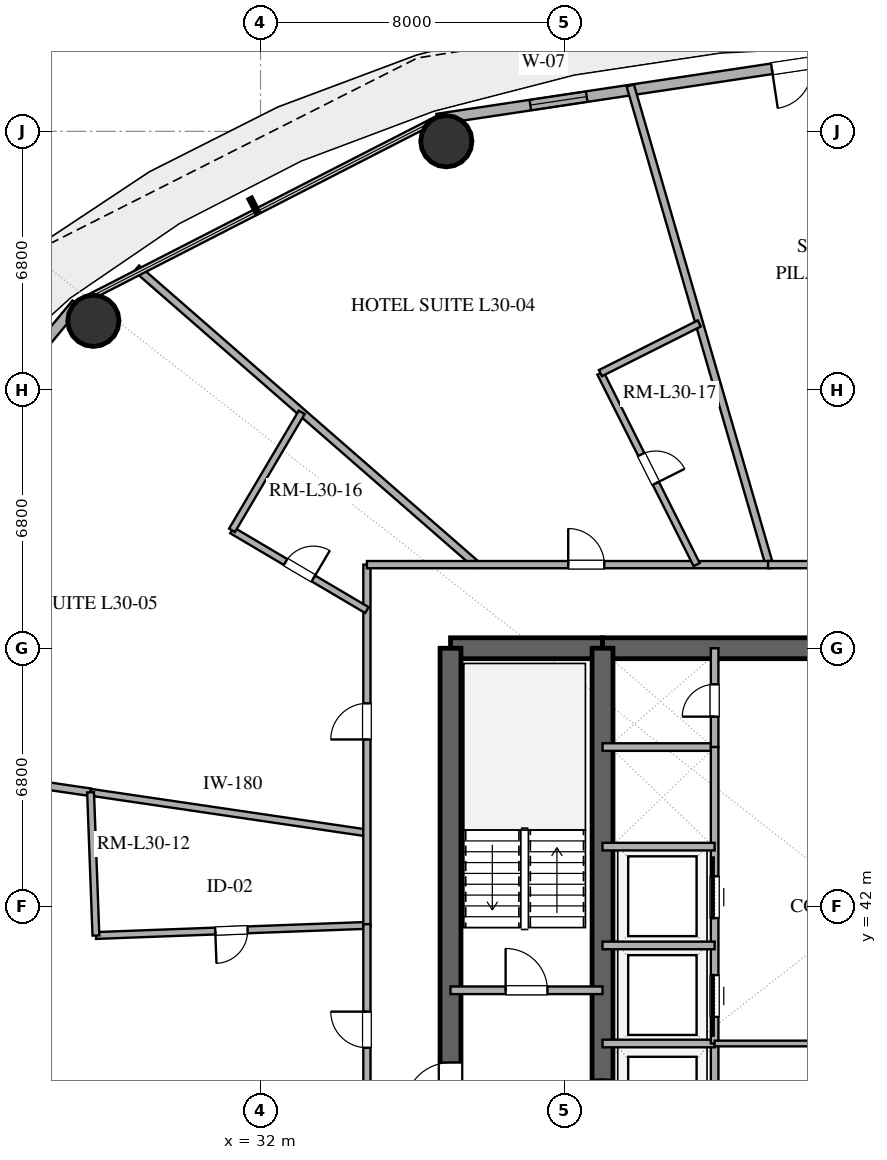
"""IFC4 building model, lengths in metres.
Left out: names, types, materials, properties, quantities, classifications, styles, units other than length and angle.
Written with IfcOpenShell. Run it as: python <this file> out.ifc"""

import sys

from ifc_helpers import new_model, si_unit, direction, frame, frame_2d, origin, origin_2d, place, context, subcontext, project, spatial, rectangle, hollow_circle, extrude, element, fill, save


model = new_model("IFC4")
c1 = context("Model", 3, precision=1e-05, world=origin(), true_north=direction((0.0, 1.0)))
c2 = subcontext(c1, "Body", "Model", "MODEL_VIEW")
j1 = project(units=[si_unit("LENGTHUNIT", "METRE"), si_unit("PLANEANGLEUNIT", "RADIAN")], contexts=[c1])
p1 = place(None, origin())
s1 = spatial("IfcSite", under=j1, at=p1, CompositionType="ELEMENT")
p2 = place(p1, origin())
s2 = spatial("IfcBuilding", under=s1, at=p2, CompositionType="ELEMENT")
p3 = place(p2, frame((0.0, 0.0, 120.0)))
s3 = spatial("IfcBuildingStorey", under=s2, at=p3, CompositionType="ELEMENT", Elevation=120.0)
p4 = place(p3, frame((37.0, 48.8, 0.0), z_axis=(0.0, 0.0, 1.0), x_axis=(1.0, 0.0, 0.0)))
e1 = element("IfcWall", 1, at=p4, inside=s3, PredefinedType="SHEAR", context=c2, shape_type="SweptSolid", body=[
    extrude(rectangle(XDim=4.0, YDim=0.55, at=frame_2d((2.0, 0.0))), origin(), (0.0, 0.0, 1.0), 3.38),
])
p5 = place(p3, frame((41.0, 48.8, 0.0), z_axis=(0.0, 0.0, 1.0), x_axis=(1.0, 0.0, 0.0)))
e2 = element("IfcWall", 2, at=p5, inside=s3, PredefinedType="SHEAR", context=c2, shape_type="SweptSolid", body=[
    extrude(rectangle(XDim=14.0, YDim=0.55, at=frame_2d((7.0, 0.0))), origin(), (0.0, 0.0, 1.0), 3.38),
])
p6 = place(p5, frame((6.1, 0.0, 0.0)))
e3 = element("IfcOpeningElement", 3, at=p6, cuts=e2, PredefinedType="OPENING", context=c2, shape_type="SweptSolid", body=[
    extrude(rectangle(XDim=1.8, YDim=2.25, at=frame_2d((0.9, 1.125))), frame((0.0, 0.285, 0.0), z_axis=(0.0, -1.0, 0.0), x_axis=(1.0, 0.0, 0.0)), (0.0, 0.0, 1.0), 0.57),
])
p7 = place(p3, frame((37.0, 35.2, 0.0), z_axis=(0.0, 0.0, 1.0), x_axis=(0.0, 1.0, 0.0)))
e4 = element("IfcWall", 4, at=p7, inside=s3, PredefinedType="SHEAR", context=c2, shape_type="SweptSolid", body=[
    extrude(rectangle(XDim=13.6, YDim=0.55, at=frame_2d((6.8, 0.0))), origin(), (0.0, 0.0, 1.0), 3.38),
])
p8 = place(p7, frame((1.5, 0.0, 0.0)))
e5 = element("IfcOpeningElement", 5, at=p8, cuts=e4, PredefinedType="OPENING", context=c2, shape_type="SweptSolid", body=[
    extrude(rectangle(XDim=1.2, YDim=2.15, at=frame_2d((0.6, 1.075))), frame((0.0, 0.285, 0.0), z_axis=(0.0, -1.0, 0.0), x_axis=(1.0, 0.0, 0.0)), (0.0, 0.0, 1.0), 0.57),
])
p9 = place(p3, frame((41.0, 35.2, 0.0), z_axis=(0.0, 0.0, 1.0), x_axis=(0.0, 1.0, 0.0)))
e6 = element("IfcWall", 6, at=p9, inside=s3, PredefinedType="SHEAR", context=c2, shape_type="SweptSolid", body=[
    extrude(rectangle(XDim=13.6, YDim=0.55, at=frame_2d((6.8, 0.0))), origin(), (0.0, 0.0, 1.0), 3.38),
])
p10 = place(p9, frame((1.15, 0.0, 0.0)))
e7 = element("IfcOpeningElement", 7, at=p10, cuts=e6, PredefinedType="OPENING", context=c2, shape_type="SweptSolid", body=[
    extrude(rectangle(XDim=1.1, YDim=2.2, at=frame_2d((0.55, 1.1))), frame((0.0, 0.285, 0.0), z_axis=(0.0, -1.0, 0.0), x_axis=(1.0, 0.0, 0.0)), (0.0, 0.0, 1.0), 0.57),
])
for number, where, z_axis, x_axis in (
    (8, (36.89, 62.141, 0.0), (0.0, 0.0, 1.0), (1.0, 0.0, 0.0)),
    (9, (27.602, 57.415, 0.0), (0.0, 0.0, 1.0), (1.0, 0.0, 0.0)),
):
    element("IfcColumn", number, at=place(p3, frame(where, z_axis=z_axis, x_axis=x_axis)), inside=s3, PredefinedType="COLUMN", context=c2, shape_type="SweptSolid", body=[
        extrude(hollow_circle(Radius=0.675, WallThickness=0.036, at=origin_2d()), origin(), (0.0, 0.0, 1.0), 3.38),
    ])
p11 = place(p3, frame((48.0, 64.43, 0.0), z_axis=(0.0, 0.0, 1.0), x_axis=(-0.988877774656, -0.148730450117, 0.0)))
e10 = element("IfcWall", 10, at=p11, inside=s3, PredefinedType="SOLIDWALL", context=c2, shape_type="SweptSolid", body=[
    extrude(rectangle(XDim=11.479, YDim=0.28, at=frame_2d((5.74, 0.0))), origin(), (0.0, 0.0, 1.0), 3.38),
])
p12 = place(p11, frame((1.524, 0.0, 0.0)))
e11 = element("IfcOpeningElement", 11, at=p12, cuts=e10, PredefinedType="OPENING", context=c2, shape_type="SweptSolid", body=[
    extrude(rectangle(XDim=1.05, YDim=2.2, at=frame_2d((0.525, 1.1))), frame((0.0, 0.15, 0.0), z_axis=(0.0, -1.0, 0.0), x_axis=(1.0, 0.0, 0.0)), (0.0, 0.0, 1.0), 0.3),
])
p13 = place(p11, frame((7.5, 0.0, 0.85)))
e12 = element("IfcOpeningElement", 12, at=p13, cuts=e10, PredefinedType="OPENING", context=c2, shape_type="SweptSolid", body=[
    extrude(rectangle(XDim=1.5, YDim=1.8, at=frame_2d((0.75, 0.9))), frame((0.0, 0.15, 0.0), z_axis=(0.0, -1.0, 0.0), x_axis=(1.0, 0.0, 0.0)), (0.0, 0.0, 1.0), 0.3),
])
p14 = place(p3, frame((27.16, 57.86, 0.0), z_axis=(0.0, 0.0, 1.0), x_axis=(-0.637505817448, -0.770445541696, 0.0)))
e13 = element("IfcWall", 13, at=p14, inside=s3, PredefinedType="SOLIDWALL", context=c2, shape_type="SweptSolid", body=[
    extrude(rectangle(XDim=9.445, YDim=0.28, at=frame_2d((4.723, 0.0))), origin(), (0.0, 0.0, 1.0), 3.38),
])
p15 = place(p14, frame((2.697, 0.0, 0.85)))
e14 = element("IfcOpeningElement", 14, at=p15, cuts=e13, PredefinedType="OPENING", context=c2, shape_type="SweptSolid", body=[
    extrude(rectangle(XDim=1.35, YDim=1.8, at=frame_2d((0.675, 0.9))), frame((0.0, 0.15, 0.0), z_axis=(0.0, -1.0, 0.0), x_axis=(1.0, 0.0, 0.0)), (0.0, 0.0, 1.0), 0.3),
])
p16 = place(p14, frame((5.282, 0.0, 0.85)))
e15 = element("IfcOpeningElement", 15, at=p16, cuts=e13, PredefinedType="OPENING", context=c2, shape_type="SweptSolid", body=[
    extrude(rectangle(XDim=1.35, YDim=1.8, at=frame_2d((0.675, 0.9))), frame((0.0, 0.15, 0.0), z_axis=(0.0, -1.0, 0.0), x_axis=(1.0, 0.0, 0.0)), (0.0, 0.0, 1.0), 0.3),
])
p17 = place(p3, frame((37.0, 39.8, 0.0), z_axis=(0.0, 0.0, 1.0), x_axis=(1.0, 0.0, 0.0)))
e16 = element("IfcWall", 16, at=p17, inside=s3, PredefinedType="SOLIDWALL", context=c2, shape_type="SweptSolid", body=[
    extrude(rectangle(XDim=4.0, YDim=0.2, at=frame_2d((2.0, 0.0))), origin(), (0.0, 0.0, 1.0), 2.74),
])
p18 = place(p17, frame((1.45, 0.0, 0.0)))
e17 = element("IfcOpeningElement", 17, at=p18, cuts=e16, PredefinedType="OPENING", context=c2, shape_type="SweptSolid", body=[
    extrude(rectangle(XDim=1.1, YDim=2.15, at=frame_2d((0.55, 1.075))), frame((0.0, 0.11, 0.0), z_axis=(0.0, -1.0, 0.0), x_axis=(1.0, 0.0, 0.0)), (0.0, 0.0, 1.0), 0.22),
])
p19 = place(p3, frame((43.95, 35.2, 0.0), z_axis=(0.0, 0.0, 1.0), x_axis=(0.0, 1.0, 0.0)))
e18 = element("IfcWall", 18, at=p19, inside=s3, PredefinedType="SOLIDWALL", context=c2, shape_type="SweptSolid", body=[
    extrude(rectangle(XDim=3.2, YDim=0.2, at=frame_2d((1.6, 0.0))), origin(), (0.0, 0.0, 1.0), 2.74),
])
for number, where, z_axis, x_axis in (
    (19, (41.0, 38.4, 0.0), (0.0, 0.0, 1.0), (1.0, 0.0, 0.0)),
    (20, (41.0, 46.2, 0.0), (0.0, 0.0, 1.0), (1.0, 0.0, 0.0)),
):
    element("IfcWall", number, at=place(p3, frame(where, z_axis=z_axis, x_axis=x_axis)), inside=s3, PredefinedType="SOLIDWALL", context=c2, shape_type="SweptSolid", body=[
        extrude(rectangle(XDim=2.95, YDim=0.2, at=frame_2d((1.475, 0.0))), origin(), (0.0, 0.0, 1.0), 2.74),
    ])
p20 = place(p3, frame((43.95, 46.2, 0.0), z_axis=(0.0, 0.0, 1.0), x_axis=(0.0, 1.0, 0.0)))
e21 = element("IfcWall", 21, at=p20, inside=s3, PredefinedType="SOLIDWALL", context=c2, shape_type="SweptSolid", body=[
    extrude(rectangle(XDim=2.6, YDim=0.2, at=frame_2d((1.3, 0.0))), origin(), (0.0, 0.0, 1.0), 2.74),
])
p21 = place(p20, frame((0.8, 0.0, 0.0)))
e22 = element("IfcOpeningElement", 22, at=p21, cuts=e21, PredefinedType="OPENING", context=c2, shape_type="SweptSolid", body=[
    extrude(rectangle(XDim=0.85, YDim=2.15, at=frame_2d((0.425, 1.075))), frame((0.0, 0.11, 0.0), z_axis=(0.0, -1.0, 0.0), x_axis=(1.0, 0.0, 0.0)), (0.0, 0.0, 1.0), 0.22),
])
p22 = place(p3, frame((43.95, 38.4, 0.0), z_axis=(0.0, 0.0, 1.0), x_axis=(0.0, 1.0, 0.0)))
e23 = element("IfcWall", 23, at=p22, inside=s3, PredefinedType="SOLIDWALL", context=c2, shape_type="SweptSolid", body=[
    extrude(rectangle(XDim=7.8, YDim=0.2, at=frame_2d((3.9, 0.0))), origin(), (0.0, 0.0, 1.0), 2.74),
])
p23 = place(p22, frame((0.7, 0.0, 0.0)))
e24 = element("IfcOpeningElement", 24, at=p23, cuts=e23, PredefinedType="OPENING", context=c2, shape_type="SweptSolid", body=[
    extrude(rectangle(XDim=1.1, YDim=2.2, at=frame_2d((0.55, 1.1))), frame((0.0, 0.11, 0.0), z_axis=(0.0, -1.0, 0.0), x_axis=(1.0, 0.0, 0.0)), (0.0, 0.0, 1.0), 0.22),
])
p24 = place(p22, frame((3.3, 0.0, 0.0)))
e25 = element("IfcOpeningElement", 25, at=p24, cuts=e23, PredefinedType="OPENING", context=c2, shape_type="SweptSolid", body=[
    extrude(rectangle(XDim=1.1, YDim=2.2, at=frame_2d((0.55, 1.1))), frame((0.0, 0.11, 0.0), z_axis=(0.0, -1.0, 0.0), x_axis=(1.0, 0.0, 0.0)), (0.0, 0.0, 1.0), 0.22),
])
for number, where, z_axis, x_axis in (
    (26, (41.0, 40.98, 0.0), (0.0, 0.0, 1.0), (1.0, 0.0, 0.0)),
    (27, (41.0, 43.58, 0.0), (0.0, 0.0, 1.0), (1.0, 0.0, 0.0)),
):
    element("IfcWall", number, at=place(p3, frame(where, z_axis=z_axis, x_axis=x_axis)), inside=s3, PredefinedType="SOLIDWALL", context=c2, shape_type="SweptSolid", body=[
        extrude(rectangle(XDim=2.95, YDim=0.2, at=frame_2d((1.475, 0.0))), origin(), (0.0, 0.0, 1.0), 2.74),
    ])
p25 = place(p3, frame((43.95, 38.4, 0.0), z_axis=(0.0, 0.0, 1.0), x_axis=(1.0, 0.0, 0.0)))
e28 = element("IfcWall", 28, at=p25, inside=s3, PredefinedType="PARTITIONING", context=c2, shape_type="SweptSolid", body=[
    extrude(rectangle(XDim=2.9, YDim=0.15, at=frame_2d((1.45, 0.0))), origin(), (0.0, 0.0, 1.0), 2.74),
])
p26 = place(p3, frame((19.982, 46.119, 0.0), z_axis=(0.0, 0.0, 1.0), x_axis=(0.989365774641, -0.14544883626, 0.0)))
e29 = element("IfcWall", 29, at=p26, inside=s3, PredefinedType="PARTITIONING", context=c2, shape_type="SweptSolid", body=[
    extrude(rectangle(XDim=7.627, YDim=0.2, at=frame_2d((3.813, 0.0))), origin(), (0.0, 0.0, 1.0), 2.74),
])
p27 = place(p3, frame((27.528, 45.01, 0.0), z_axis=(0.0, 0.0, 1.0), x_axis=(0.989364619243, -0.145456695238, 0.0)))
e30 = element("IfcWall", 30, at=p27, inside=s3, PredefinedType="PLUMBINGWALL", context=c2, shape_type="SweptSolid", body=[
    extrude(rectangle(XDim=7.35, YDim=0.18, at=frame_2d((3.675, 0.0))), origin(), (0.0, 0.0, 1.0), 2.74),
])
p28 = place(p3, frame((34.8, 41.508, 0.0), z_axis=(0.0, 0.0, 1.0), x_axis=(-0.999305711591, -0.037257144028, 0.0)))
e31 = element("IfcWall", 31, at=p28, inside=s3, PredefinedType="PLUMBINGWALL", context=c2, shape_type="SweptSolid", body=[
    extrude(rectangle(XDim=7.136, YDim=0.18, at=frame_2d((3.568, 0.0))), origin(), (0.0, 0.0, 1.0), 2.74),
])
p29 = place(p28, frame((3.143, 0.0, 0.0)))
e32 = element("IfcOpeningElement", 32, at=p29, cuts=e31, PredefinedType="OPENING", context=c2, shape_type="SweptSolid", body=[
    extrude(rectangle(XDim=0.85, YDim=2.1, at=frame_2d((0.425, 1.05))), frame((0.0, 0.1, 0.0), z_axis=(0.0, -1.0, 0.0), x_axis=(1.0, 0.0, 0.0)), (0.0, 0.0, 1.0), 0.2),
])
p30 = place(p3, frame((45.388, 51.0, 0.0), z_axis=(0.0, 0.0, 1.0), x_axis=(-0.278690680179, 0.960380916502, 0.0)))
e33 = element("IfcWall", 33, at=p30, inside=s3, PredefinedType="PARTITIONING", context=c2, shape_type="SweptSolid", body=[
    extrude(rectangle(XDim=13.127, YDim=0.2, at=frame_2d((6.563, 0.0))), origin(), (0.0, 0.0, 1.0), 2.74),
])
p31 = place(p3, frame((37.68, 51.0, 0.0), z_axis=(0.0, 0.0, 1.0), x_axis=(-0.753659518717, 0.657265037749, 0.0)))
e34 = element("IfcWall", 34, at=p31, inside=s3, PredefinedType="PARTITIONING", context=c2, shape_type="SweptSolid", body=[
    extrude(rectangle(XDim=11.861, YDim=0.2, at=frame_2d((5.93, 0.0))), origin(), (0.0, 0.0, 1.0), 2.74),
])
p32 = place(p3, frame((34.8, 41.476, 0.0), z_axis=(0.0, 0.0, 1.0), x_axis=(0.0, 1.0, 0.0)))
e35 = element("IfcWall", 35, at=p32, inside=s3, PredefinedType="PARTITIONING", context=c2, shape_type="SweptSolid", body=[
    extrude(rectangle(XDim=9.524, YDim=0.19, at=frame_2d((4.762, 0.0))), origin(), (0.0, 0.0, 1.0), 2.74),
])
p33 = place(p32, frame((4.924, 0.0, 0.0)))
e36 = element("IfcOpeningElement", 36, at=p33, cuts=e35, PredefinedType="OPENING", context=c2, shape_type="SweptSolid", body=[
    extrude(rectangle(XDim=0.95, YDim=2.15, at=frame_2d((0.475, 1.075))), frame((0.0, 0.105, 0.0), z_axis=(0.0, -1.0, 0.0), x_axis=(1.0, 0.0, 0.0)), (0.0, 0.0, 1.0), 0.21),
])
p34 = place(p3, frame((34.8, 51.0, 0.0), z_axis=(0.0, 0.0, 1.0), x_axis=(1.0, 0.0, 0.0)))
e37 = element("IfcWall", 37, at=p34, inside=s3, PredefinedType="PARTITIONING", context=c2, shape_type="SweptSolid", body=[
    extrude(rectangle(XDim=10.622, YDim=0.19, at=frame_2d((5.311, 0.0))), origin(), (0.0, 0.0, 1.0), 2.74),
])
p35 = place(p34, frame((5.297, 0.0, 0.0)))
e38 = element("IfcOpeningElement", 38, at=p35, cuts=e37, PredefinedType="OPENING", context=c2, shape_type="SweptSolid", body=[
    extrude(rectangle(XDim=0.95, YDim=2.15, at=frame_2d((0.475, 1.075))), frame((0.0, 0.105, 0.0), z_axis=(0.0, -1.0, 0.0), x_axis=(1.0, 0.0, 0.0)), (0.0, 0.0, 1.0), 0.21),
])
p36 = place(p3, frame((40.945, 56.039, 0.0), z_axis=(0.0, 0.0, 1.0), x_axis=(0.44904833135, -0.893507468414, 0.0)))
e39 = element("IfcWall", 39, at=p36, inside=s3, PredefinedType="PLUMBINGWALL", context=c2, shape_type="SweptSolid", body=[
    extrude(rectangle(XDim=5.639, YDim=0.18, at=frame_2d((2.82, 0.0))), origin(), (0.0, 0.0, 1.0), 2.74),
])
p37 = place(p36, frame((2.395, 0.0, 0.0)))
e40 = element("IfcOpeningElement", 40, at=p37, cuts=e39, PredefinedType="OPENING", context=c2, shape_type="SweptSolid", body=[
    extrude(rectangle(XDim=0.85, YDim=2.1, at=frame_2d((0.425, 1.05))), frame((0.0, 0.1, 0.0), z_axis=(0.0, -1.0, 0.0), x_axis=(1.0, 0.0, 0.0)), (0.0, 0.0, 1.0), 0.2),
])
p38 = place(p3, frame((34.8, 33.0, 0.0), z_axis=(0.0, 0.0, 1.0), x_axis=(0.0, 1.0, 0.0)))
e41 = element("IfcWall", 41, at=p38, inside=s3, PredefinedType="PARTITIONING", context=c2, shape_type="SweptSolid", body=[
    extrude(rectangle(XDim=8.54, YDim=0.19, at=frame_2d((4.27, 0.0))), origin(), (0.0, 0.0, 1.0), 2.74),
])
p39 = place(p38, frame((5.288, 0.0, 0.0)))
e42 = element("IfcOpeningElement", 42, at=p39, cuts=e41, PredefinedType="OPENING", context=c2, shape_type="SweptSolid", body=[
    extrude(rectangle(XDim=0.95, YDim=2.15, at=frame_2d((0.475, 1.075))), frame((0.0, 0.105, 0.0), z_axis=(0.0, -1.0, 0.0), x_axis=(1.0, 0.0, 0.0)), (0.0, 0.0, 1.0), 0.21),
])
p40 = place(p3, frame((45.355, 51.0, 0.0), z_axis=(0.0, 0.0, 1.0), x_axis=(1.0, 0.0, 0.0)))
e43 = element("IfcWall", 43, at=p40, inside=s3, PredefinedType="PARTITIONING", context=c2, shape_type="SweptSolid", body=[
    extrude(rectangle(XDim=15.845, YDim=0.19, at=frame_2d((7.922, 0.0))), origin(), (0.0, 0.0, 1.0), 2.74),
])
p41 = place(p40, frame((2.176, 0.0, 0.0)))
e44 = element("IfcOpeningElement", 44, at=p41, cuts=e43, PredefinedType="OPENING", context=c2, shape_type="SweptSolid", body=[
    extrude(rectangle(XDim=1.0, YDim=2.2, at=frame_2d((0.5, 1.1))), frame((0.0, 0.105, 0.0), z_axis=(0.0, -1.0, 0.0), x_axis=(1.0, 0.0, 0.0)), (0.0, 0.0, 1.0), 0.21),
])
p42 = place(p40, frame((7.125, 0.0, 0.0)))
e45 = element("IfcOpeningElement", 45, at=p42, cuts=e43, PredefinedType="OPENING", context=c2, shape_type="SweptSolid", body=[
    extrude(rectangle(XDim=0.95, YDim=2.15, at=frame_2d((0.475, 1.075))), frame((0.0, 0.105, 0.0), z_axis=(0.0, -1.0, 0.0), x_axis=(1.0, 0.0, 0.0)), (0.0, 0.0, 1.0), 0.21),
])
p43 = place(p3, frame((31.25, 51.902, 0.0), z_axis=(0.0, 0.0, 1.0), x_axis=(0.860833406846, -0.508886869214, 0.0)))
e46 = element("IfcWall", 46, at=p43, inside=s3, PredefinedType="PLUMBINGWALL", context=c2, shape_type="SweptSolid", body=[
    extrude(rectangle(XDim=4.124, YDim=0.18, at=frame_2d((2.062, 0.0))), origin(), (0.0, 0.0, 1.0), 2.74),
])
p44 = place(p43, frame((1.637, 0.0, 0.0)))
e47 = element("IfcOpeningElement", 47, at=p44, cuts=e46, PredefinedType="OPENING", context=c2, shape_type="SweptSolid", body=[
    extrude(rectangle(XDim=0.85, YDim=2.1, at=frame_2d((0.425, 1.05))), frame((0.0, 0.1, 0.0), z_axis=(0.0, -1.0, 0.0), x_axis=(1.0, 0.0, 0.0)), (0.0, 0.0, 1.0), 0.2),
])
p45 = place(p3, frame((27.669, 41.242, 0.0), z_axis=(0.0, 0.0, 1.0), x_axis=(-0.037294239527, 0.999304327869, 0.0)))
e48 = element("IfcWall", 48, at=p45, inside=s3, PredefinedType="PLUMBINGWALL", context=c2, shape_type="SweptSolid", body=[
    extrude(rectangle(XDim=3.771, YDim=0.18, at=frame_2d((1.885, 0.0))), origin(), (0.0, 0.0, 1.0), 2.74),
])
p46 = place(p3, frame((33.085, 55.007, 0.0), z_axis=(0.0, 0.0, 1.0), x_axis=(-0.508909491775, -0.860820032981, 0.0)))
e49 = element("IfcWall", 49, at=p46, inside=s3, PredefinedType="PLUMBINGWALL", context=c2, shape_type="SweptSolid", body=[
    extrude(rectangle(XDim=3.606, YDim=0.18, at=frame_2d((1.803, 0.0))), origin(), (0.0, 0.0, 1.0), 2.74),
])
p47 = place(p3, frame((43.547, 57.346, 0.0), z_axis=(0.0, 0.0, 1.0), x_axis=(-0.893519933294, -0.449023528122, 0.0)))
e50 = element("IfcWall", 50, at=p47, inside=s3, PredefinedType="PLUMBINGWALL", context=c2, shape_type="SweptSolid", body=[
    extrude(rectangle(XDim=2.912, YDim=0.18, at=frame_2d((1.456, 0.0))), origin(), (0.0, 0.0, 1.0), 2.74),
])
p48 = place(p12, origin())
e51 = element("IfcDoor", 51, at=p48, inside=s3, OperationType="SINGLE_SWING_RIGHT", PredefinedType="DOOR", context=c2, shape_type="SweptSolid", body=[
    extrude(rectangle(XDim=1.05, YDim=2.2, at=frame_2d((0.525, 1.1))), frame((0.0, 0.025, 0.0), z_axis=(0.0, -1.0, 0.0), x_axis=(1.0, 0.0, 0.0)), (0.0, 0.0, 1.0), 0.05),
])
fill(e11, e51)
p49 = place(p13, origin())
e52 = element("IfcWindow", 52, at=p49, inside=s3, PartitioningType="SINGLE_PANEL", PredefinedType="WINDOW", context=c2, shape_type="SweptSolid", body=[
    extrude(rectangle(XDim=1.5, YDim=1.8, at=frame_2d((0.75, 0.9))), frame((0.0, 0.03, 0.0), z_axis=(0.0, -1.0, 0.0), x_axis=(1.0, 0.0, 0.0)), (0.0, 0.0, 1.0), 0.06),
])
fill(e12, e52)
p50 = place(p8, origin())
e53 = element("IfcDoor", 53, at=p50, inside=s3, OperationType="SINGLE_SWING_LEFT", PredefinedType="DOOR", context=c2, shape_type="SweptSolid", body=[
    extrude(rectangle(XDim=1.2, YDim=2.15, at=frame_2d((0.6, 1.075))), frame((0.0, 0.025, 0.0), z_axis=(0.0, -1.0, 0.0), x_axis=(1.0, 0.0, 0.0)), (0.0, 0.0, 1.0), 0.05),
])
fill(e5, e53)
p51 = place(p18, origin())
e54 = element("IfcDoor", 54, at=p51, inside=s3, OperationType="SINGLE_SWING_LEFT", PredefinedType="DOOR", context=c2, shape_type="SweptSolid", body=[
    extrude(rectangle(XDim=1.1, YDim=2.15, at=frame_2d((0.55, 1.075))), frame((0.0, 0.025, 0.0), z_axis=(0.0, -1.0, 0.0), x_axis=(1.0, 0.0, 0.0)), (0.0, 0.0, 1.0), 0.05),
])
fill(e17, e54)
p52 = place(p21, origin())
e55 = element("IfcDoor", 55, at=p52, inside=s3, OperationType="SINGLE_SWING_LEFT", PredefinedType="DOOR", context=c2, shape_type="SweptSolid", body=[
    extrude(rectangle(XDim=0.85, YDim=2.15, at=frame_2d((0.425, 1.075))), frame((0.0, 0.025, 0.0), z_axis=(0.0, -1.0, 0.0), x_axis=(1.0, 0.0, 0.0)), (0.0, 0.0, 1.0), 0.05),
])
fill(e22, e55)
p53 = place(p23, origin())
e56 = element("IfcDoor", 56, at=p53, inside=s3, OperationType="SLIDING_TO_LEFT", PredefinedType="DOOR", context=c2, shape_type="SweptSolid", body=[
    extrude(rectangle(XDim=1.1, YDim=2.2, at=frame_2d((0.55, 1.1))), frame((0.0, 0.025, 0.0), z_axis=(0.0, -1.0, 0.0), x_axis=(1.0, 0.0, 0.0)), (0.0, 0.0, 1.0), 0.05),
])
fill(e24, e56)
p54 = place(p24, origin())
e57 = element("IfcDoor", 57, at=p54, inside=s3, OperationType="SLIDING_TO_RIGHT", PredefinedType="DOOR", context=c2, shape_type="SweptSolid", body=[
    extrude(rectangle(XDim=1.1, YDim=2.2, at=frame_2d((0.55, 1.1))), frame((0.0, 0.025, 0.0), z_axis=(0.0, -1.0, 0.0), x_axis=(1.0, 0.0, 0.0)), (0.0, 0.0, 1.0), 0.05),
])
fill(e25, e57)
p55 = place(p29, origin())
e58 = element("IfcDoor", 58, at=p55, inside=s3, OperationType="SINGLE_SWING_RIGHT", PredefinedType="DOOR", context=c2, shape_type="SweptSolid", body=[
    extrude(rectangle(XDim=0.85, YDim=2.1, at=frame_2d((0.425, 1.05))), frame((0.0, 0.025, 0.0), z_axis=(0.0, -1.0, 0.0), x_axis=(1.0, 0.0, 0.0)), (0.0, 0.0, 1.0), 0.05),
])
fill(e32, e58)
p56 = place(p33, origin())
e59 = element("IfcDoor", 59, at=p56, inside=s3, OperationType="SINGLE_SWING_LEFT", PredefinedType="DOOR", context=c2, shape_type="SweptSolid", body=[
    extrude(rectangle(XDim=0.95, YDim=2.15, at=frame_2d((0.475, 1.075))), frame((0.0, 0.025, 0.0), z_axis=(0.0, -1.0, 0.0), x_axis=(1.0, 0.0, 0.0)), (0.0, 0.0, 1.0), 0.05),
])
fill(e36, e59)
p57 = place(p35, origin())
e60 = element("IfcDoor", 60, at=p57, inside=s3, OperationType="SINGLE_SWING_LEFT", PredefinedType="DOOR", context=c2, shape_type="SweptSolid", body=[
    extrude(rectangle(XDim=0.95, YDim=2.15, at=frame_2d((0.475, 1.075))), frame((0.0, 0.025, 0.0), z_axis=(0.0, -1.0, 0.0), x_axis=(1.0, 0.0, 0.0)), (0.0, 0.0, 1.0), 0.05),
])
fill(e38, e60)
p58 = place(p37, origin())
e61 = element("IfcDoor", 61, at=p58, inside=s3, OperationType="SINGLE_SWING_RIGHT", PredefinedType="DOOR", context=c2, shape_type="SweptSolid", body=[
    extrude(rectangle(XDim=0.85, YDim=2.1, at=frame_2d((0.425, 1.05))), frame((0.0, 0.025, 0.0), z_axis=(0.0, -1.0, 0.0), x_axis=(1.0, 0.0, 0.0)), (0.0, 0.0, 1.0), 0.05),
])
fill(e40, e61)
p59 = place(p39, origin())
e62 = element("IfcDoor", 62, at=p59, inside=s3, OperationType="SINGLE_SWING_RIGHT", PredefinedType="DOOR", context=c2, shape_type="SweptSolid", body=[
    extrude(rectangle(XDim=0.95, YDim=2.15, at=frame_2d((0.475, 1.075))), frame((0.0, 0.025, 0.0), z_axis=(0.0, -1.0, 0.0), x_axis=(1.0, 0.0, 0.0)), (0.0, 0.0, 1.0), 0.05),
])
fill(e42, e62)
p60 = place(p44, origin())
e63 = element("IfcDoor", 63, at=p60, inside=s3, OperationType="SINGLE_SWING_RIGHT", PredefinedType="DOOR", context=c2, shape_type="SweptSolid", body=[
    extrude(rectangle(XDim=0.85, YDim=2.1, at=frame_2d((0.425, 1.05))), frame((0.0, 0.025, 0.0), z_axis=(0.0, -1.0, 0.0), x_axis=(1.0, 0.0, 0.0)), (0.0, 0.0, 1.0), 0.05),
])
fill(e47, e63)
save(model, sys.argv[1])
